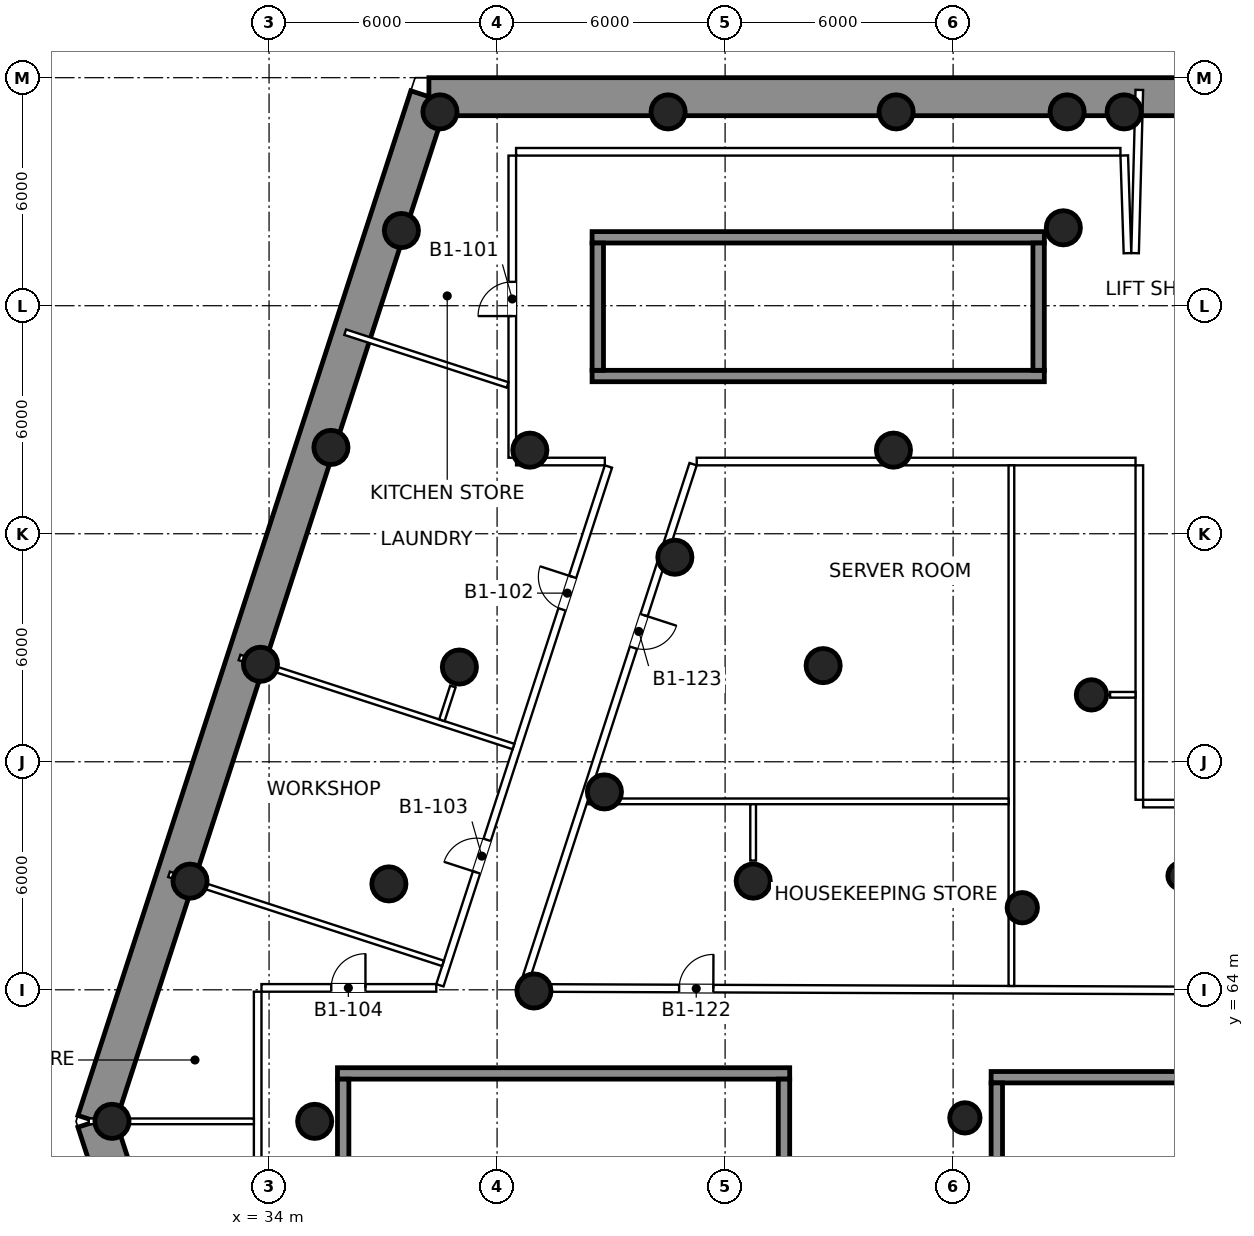
"""IFC4 building model, lengths in metres.
Left out: names, types, materials, properties, quantities, classifications, styles, units other than length and angle.
Written with IfcOpenShell. Run it as: python <this file> out.ifc"""

import sys

from ifc_helpers import new_model, si_unit, direction, frame, frame_2d, origin, origin_2d, place, context, subcontext, project, spatial, rectangle, circle, extrude, element, fill, save


model = new_model("IFC4")
c1 = context("Model", 3, precision=1e-05, world=origin(), true_north=direction((0.0, 1.0)))
c2 = subcontext(c1, "Body", "Model", "MODEL_VIEW")
j1 = project(units=[si_unit("LENGTHUNIT", "METRE"), si_unit("PLANEANGLEUNIT", "RADIAN")], contexts=[c1])
p1 = place(None, origin())
s1 = spatial("IfcSite", under=j1, at=p1, CompositionType="ELEMENT")
p2 = place(p1, origin())
s2 = spatial("IfcBuilding", under=s1, at=p2, CompositionType="ELEMENT")
p3 = place(p2, frame((0.0, 0.0, -5.0)))
s3 = spatial("IfcBuildingStorey", under=s2, at=p3, CompositionType="ELEMENT", Elevation=-5.0)
p4 = place(p3, frame((35.156, 42.963, 0.0), z_axis=(0.0, 0.0, 1.0), x_axis=(-0.309001835939, 0.951061441436, 0.0)))
e1 = element("IfcWall", 1, at=p4, inside=s3, PredefinedType="SOLIDWALL", context=c2, shape_type="SweptSolid", body=[
    extrude(rectangle(XDim=18.481, YDim=1.0, at=frame_2d((9.241, 0.0))), origin(), (0.0, 0.0, 1.0), 4.55),
])
p5 = place(p3, frame((29.446, 60.539, 0.0), z_axis=(0.0, 0.0, 1.0), x_axis=(0.309015382076, 0.951057040161, 0.0)))
e2 = element("IfcWall", 2, at=p5, inside=s3, PredefinedType="SOLIDWALL", context=c2, shape_type="SweptSolid", body=[
    extrude(rectangle(XDim=28.348, YDim=1.0, at=frame_2d((14.174, 0.0))), origin(), (0.0, 0.0, 1.0), 4.55),
])
p6 = place(p3, frame((38.206, 87.5, 0.0), z_axis=(0.0, 0.0, 1.0), x_axis=(1.0, 0.0, 0.0)))
e3 = element("IfcWall", 3, at=p6, inside=s3, PredefinedType="SOLIDWALL", context=c2, shape_type="SweptSolid", body=[
    extrude(rectangle(XDim=20.794, YDim=1.0, at=frame_2d((10.397, 0.0))), origin(), (0.0, 0.0, 1.0), 4.55),
])
for number, where, z_axis, x_axis in (
    (4, (54.9, 84.05, 0.0), (0.0, 0.0, 1.0), (1.0, 0.0, 0.0)),
    (5, (50.43, 78.2, 0.0), (0.0, 0.0, 1.0), (1.0, 0.0, 0.0)),
    (6, (48.58, 72.53, 0.0), (0.0, 0.0, 1.0), (1.0, 0.0, 0.0)),
    (7, (46.74, 66.86, 0.0), (0.0, 0.0, 1.0), (1.0, 0.0, 0.0)),
):
    element("IfcColumn", number, at=place(p3, frame(where, z_axis=z_axis, x_axis=x_axis)), inside=s3, PredefinedType="COLUMN", context=c2, shape_type="SweptSolid", body=[
        extrude(circle(Radius=0.45, at=origin_2d()), origin(), (0.0, 0.0, 1.0), 5.0),
    ])
for number, where, z_axis, x_axis in (
    (8, (52.31, 60.63, 0.0), (0.0, 0.0, 1.0), (1.0, 0.0, 0.0)),
    (9, (55.64, 71.76, 0.0), (0.0, 0.0, 1.0), (1.0, 0.0, 0.0)),
    (10, (53.82, 66.16, 0.0), (0.0, 0.0, 1.0), (1.0, 0.0, 0.0)),
):
    element("IfcColumn", number, at=place(p3, frame(where, z_axis=z_axis, x_axis=x_axis)), inside=s3, PredefinedType="COLUMN", context=c2, shape_type="SweptSolid", body=[
        extrude(circle(Radius=0.4, at=origin_2d()), origin(), (0.0, 0.0, 1.0), 5.0),
    ])
p7 = place(p3, frame((58.0, 67.0, 0.0), z_axis=(0.0, 0.0, 1.0), x_axis=(1.0, 0.0, 0.0)))
e11 = element("IfcColumn", 11, at=p7, inside=s3, PredefinedType="COLUMN", context=c2, shape_type="SweptSolid", body=[
    extrude(circle(Radius=0.35, at=origin_2d()), origin(), (0.0, 0.0, 1.0), 5.0),
])
for number, where, z_axis, x_axis in (
    (12, (29.866, 60.539, 0.0), (0.0, 0.0, 1.0), (1.0, 0.0, 0.0)),
    (13, (56.5, 87.1, 0.0), (0.0, 0.0, 1.0), (1.0, 0.0, 0.0)),
    (14, (50.5, 87.1, 0.0), (0.0, 0.0, 1.0), (1.0, 0.0, 0.0)),
    (15, (44.5, 87.1, 0.0), (0.0, 0.0, 1.0), (1.0, 0.0, 0.0)),
    (16, (38.496, 87.1, 0.0), (0.0, 0.0, 1.0), (1.0, 0.0, 0.0)),
    (17, (37.482, 83.978, 0.0), (0.0, 0.0, 1.0), (1.0, 0.0, 0.0)),
    (18, (35.628, 78.271, 0.0), (0.0, 0.0, 1.0), (1.0, 0.0, 0.0)),
    (19, (33.774, 72.565, 0.0), (0.0, 0.0, 1.0), (1.0, 0.0, 0.0)),
    (20, (31.92, 66.859, 0.0), (0.0, 0.0, 1.0), (1.0, 0.0, 0.0)),
    (21, (35.2, 60.539, 0.0), (0.0, 0.0, 1.0), (1.0, 0.0, 0.0)),
    (22, (40.862, 78.199, 0.0), (0.0, 0.0, 1.0), (1.0, 0.0, 0.0)),
    (23, (39.008, 72.493, 0.0), (0.0, 0.0, 1.0), (1.0, 0.0, 0.0)),
    (24, (37.153, 66.787, 0.0), (0.0, 0.0, 1.0), (1.0, 0.0, 0.0)),
    (25, (55.0, 87.1, 0.0), (0.0, 0.0, 1.0), (1.0, 0.0, 0.0)),
    (26, (44.678, 75.382, 0.0), (0.0, 0.0, 1.0), (1.0, 0.0, 0.0)),
    (27, (42.824, 69.207, 0.0), (0.0, 0.0, 1.0), (1.0, 0.0, 0.0)),
    (28, (40.97, 63.969, 0.0), (0.0, 0.0, 1.0), (1.0, 0.0, 0.0)),
):
    element("IfcColumn", number, at=place(p3, frame(where, z_axis=z_axis, x_axis=x_axis)), inside=s3, PredefinedType="COLUMN", context=c2, shape_type="SweptSolid", body=[
        extrude(circle(Radius=0.45, at=origin_2d()), origin(), (0.0, 0.0, 1.0), 5.0),
    ])
p8 = place(p3, frame((53.0, 61.7, 0.0), z_axis=(0.0, 0.0, 1.0), x_axis=(1.0, 0.0, 0.0)))
e29 = element("IfcWall", 29, at=p8, inside=s3, PredefinedType="SHEAR", context=c2, shape_type="SweptSolid", body=[
    extrude(rectangle(XDim=11.9, YDim=0.3, at=frame_2d((5.95, 0.0))), origin(), (0.0, 0.0, 1.0), 4.55),
])
p9 = place(p3, frame((53.15, 58.2, 0.0), z_axis=(0.0, 0.0, 1.0), x_axis=(0.0, 1.0, 0.0)))
e30 = element("IfcWall", 30, at=p9, inside=s3, PredefinedType="SHEAR", context=c2, shape_type="SweptSolid", body=[
    extrude(rectangle(XDim=3.35, YDim=0.3, at=frame_2d((1.675, 0.0))), origin(), (0.0, 0.0, 1.0), 4.55),
])
p10 = place(p3, frame((35.8, 61.8, 0.0), z_axis=(0.0, 0.0, 1.0), x_axis=(1.0, 0.0, 0.0)))
e31 = element("IfcWall", 31, at=p10, inside=s3, PredefinedType="SHEAR", context=c2, shape_type="SweptSolid", body=[
    extrude(rectangle(XDim=11.9, YDim=0.3, at=frame_2d((5.95, 0.0))), origin(), (0.0, 0.0, 1.0), 4.55),
])
for number, where, z_axis, x_axis in (
    (32, (35.95, 58.3, 0.0), (0.0, 0.0, 1.0), (0.0, 1.0, 0.0)),
    (33, (47.55, 58.3, 0.0), (0.0, 0.0, 1.0), (0.0, 1.0, 0.0)),
):
    element("IfcWall", number, at=place(p3, frame(where, z_axis=z_axis, x_axis=x_axis)), inside=s3, PredefinedType="SHEAR", context=c2, shape_type="SweptSolid", body=[
        extrude(rectangle(XDim=3.35, YDim=0.3, at=frame_2d((1.675, 0.0))), origin(), (0.0, 0.0, 1.0), 4.55),
    ])
for number, where, z_axis, x_axis in (
    (34, (42.5, 80.15, 0.0), (0.0, 0.0, 1.0), (1.0, 0.0, 0.0)),
    (35, (42.5, 83.8, 0.0), (0.0, 0.0, 1.0), (1.0, 0.0, 0.0)),
):
    element("IfcWall", number, at=place(p3, frame(where, z_axis=z_axis, x_axis=x_axis)), inside=s3, PredefinedType="SHEAR", context=c2, shape_type="SweptSolid", body=[
        extrude(rectangle(XDim=11.9, YDim=0.3, at=frame_2d((5.95, 0.0))), origin(), (0.0, 0.0, 1.0), 4.55),
    ])
for number, where, z_axis, x_axis in (
    (36, (42.65, 80.3, 0.0), (0.0, 0.0, 1.0), (0.0, 1.0, 0.0)),
    (37, (54.25, 80.3, 0.0), (0.0, 0.0, 1.0), (0.0, 1.0, 0.0)),
):
    element("IfcWall", number, at=place(p3, frame(where, z_axis=z_axis, x_axis=x_axis)), inside=s3, PredefinedType="SHEAR", context=c2, shape_type="SweptSolid", body=[
        extrude(rectangle(XDim=3.35, YDim=0.3, at=frame_2d((1.675, 0.0))), origin(), (0.0, 0.0, 1.0), 4.55),
    ])
p11 = place(p3, frame((33.7, 56.0, 0.0), z_axis=(0.0, 0.0, 1.0), x_axis=(0.0, 1.0, 0.0)))
e38 = element("IfcWall", 38, at=p11, inside=s3, PredefinedType="PARTITIONING", context=c2, shape_type="SweptSolid", body=[
    extrude(rectangle(XDim=7.95, YDim=0.2, at=frame_2d((3.975, 0.0))), origin(), (0.0, 0.0, 1.0), 4.55),
])
p12 = place(p3, frame((33.8, 64.05, 0.0), z_axis=(0.0, 0.0, 1.0), x_axis=(1.0, 0.0, 0.0)))
e39 = element("IfcWall", 39, at=p12, inside=s3, PredefinedType="PARTITIONING", context=c2, shape_type="SweptSolid", body=[
    extrude(rectangle(XDim=4.6, YDim=0.2, at=frame_2d((2.3, 0.0))), origin(), (0.0, 0.0, 1.0), 3.85),
])
p13 = place(p12, frame((1.836, 0.0, 0.0)))
e40 = element("IfcOpeningElement", 40, at=p13, cuts=e39, PredefinedType="OPENING", context=c2, shape_type="SweptSolid", body=[
    extrude(rectangle(XDim=0.9, YDim=2.1, at=frame_2d((0.45, 1.05))), frame((0.0, 0.11, 0.0), z_axis=(0.0, -1.0, 0.0), x_axis=(1.0, 0.0, 0.0)), (0.0, 0.0, 1.0), 0.22),
])
p14 = place(p3, frame((38.495, 64.119, 0.0), z_axis=(0.0, 0.0, 1.0), x_axis=(0.309012990643, 0.951057817177, 0.0)))
e41 = element("IfcWall", 41, at=p14, inside=s3, PredefinedType="PARTITIONING", context=c2, shape_type="SweptSolid", body=[
    extrude(rectangle(XDim=14.352, YDim=0.2, at=frame_2d((7.176, 0.0))), origin(), (0.0, 0.0, 1.0), 4.55),
])
p15 = place(p14, frame((10.399, 0.0, 0.0)))
e42 = element("IfcOpeningElement", 42, at=p15, cuts=e41, PredefinedType="OPENING", context=c2, shape_type="SweptSolid", body=[
    extrude(rectangle(XDim=0.9, YDim=2.1, at=frame_2d((0.45, 1.05))), frame((0.0, 0.11, 0.0), z_axis=(0.0, -1.0, 0.0), x_axis=(1.0, 0.0, 0.0)), (0.0, 0.0, 1.0), 0.22),
])
p16 = place(p14, frame((3.124, 0.0, 0.0)))
e43 = element("IfcOpeningElement", 43, at=p16, cuts=e41, PredefinedType="OPENING", context=c2, shape_type="SweptSolid", body=[
    extrude(rectangle(XDim=0.9, YDim=2.1, at=frame_2d((0.45, 1.05))), frame((0.0, 0.11, 0.0), z_axis=(0.0, -1.0, 0.0), x_axis=(1.0, 0.0, 0.0)), (0.0, 0.0, 1.0), 0.22),
])
p17 = place(p3, frame((42.835, 77.9, 0.0), z_axis=(0.0, 0.0, 1.0), x_axis=(-1.0, 0.0, 0.0)))
e44 = element("IfcWall", 44, at=p17, inside=s3, PredefinedType="PARTITIONING", context=c2, shape_type="SweptSolid", body=[
    extrude(rectangle(XDim=2.335, YDim=0.2, at=frame_2d((1.167, 0.0))), origin(), (0.0, 0.0, 1.0), 4.55),
])
p18 = place(p3, frame((40.4, 78.0, 0.0), z_axis=(0.0, 0.0, 1.0), x_axis=(0.0, 1.0, 0.0)))
e45 = element("IfcWall", 45, at=p18, inside=s3, PredefinedType="PARTITIONING", context=c2, shape_type="SweptSolid", body=[
    extrude(rectangle(XDim=7.95, YDim=0.2, at=frame_2d((3.975, 0.0))), origin(), (0.0, 0.0, 1.0), 4.55),
])
p19 = place(p18, frame((3.728, 0.0, 0.0)))
e46 = element("IfcOpeningElement", 46, at=p19, cuts=e45, PredefinedType="OPENING", context=c2, shape_type="SweptSolid", body=[
    extrude(rectangle(XDim=0.9, YDim=2.1, at=frame_2d((0.45, 1.05))), frame((0.0, 0.11, 0.0), z_axis=(0.0, -1.0, 0.0), x_axis=(1.0, 0.0, 0.0)), (0.0, 0.0, 1.0), 0.22),
])
p20 = place(p3, frame((40.5, 86.05, 0.0), z_axis=(0.0, 0.0, 1.0), x_axis=(1.0, 0.0, 0.0)))
e47 = element("IfcWall", 47, at=p20, inside=s3, PredefinedType="PARTITIONING", context=c2, shape_type="SweptSolid", body=[
    extrude(rectangle(XDim=15.903, YDim=0.2, at=frame_2d((7.952, 0.0))), origin(), (0.0, 0.0, 1.0), 3.85),
])
p21 = place(p3, frame((56.503, 85.953, 0.0), z_axis=(0.0, 0.0, 1.0), x_axis=(0.033027267016, -0.999454451005, 0.0)))
e48 = element("IfcWall", 48, at=p21, inside=s3, PredefinedType="PARTITIONING", context=c2, shape_type="SweptSolid", body=[
    extrude(rectangle(XDim=2.573, YDim=0.2, at=frame_2d((1.286, 0.0))), origin(), (0.0, 0.0, 1.0), 4.55),
])
p22 = place(p3, frame((56.788, 83.383, 0.0), z_axis=(0.0, 0.0, 1.0), x_axis=(0.026025742555, 0.999661272994, 0.0)))
e49 = element("IfcWall", 49, at=p22, inside=s3, PredefinedType="PARTITIONING", context=c2, shape_type="SweptSolid", body=[
    extrude(rectangle(XDim=4.296, YDim=0.2, at=frame_2d((2.148, 0.0))), origin(), (0.0, 0.0, 1.0), 3.85),
])
p23 = place(p3, frame((68.85, 68.9, 0.0), z_axis=(0.0, 0.0, 1.0), x_axis=(-1.0, 0.0, 0.0)))
e50 = element("IfcWall", 50, at=p23, inside=s3, PredefinedType="PARTITIONING", context=c2, shape_type="SweptSolid", body=[
    extrude(rectangle(XDim=11.85, YDim=0.2, at=frame_2d((5.925, 0.0))), origin(), (0.0, 0.0, 1.0), 4.55),
])
p24 = place(p3, frame((56.9, 69.0, 0.0), z_axis=(0.0, 0.0, 1.0), x_axis=(0.0, 1.0, 0.0)))
e51 = element("IfcWall", 51, at=p24, inside=s3, PredefinedType="PARTITIONING", context=c2, shape_type="SweptSolid", body=[
    extrude(rectangle(XDim=8.8, YDim=0.2, at=frame_2d((4.4, 0.0))), origin(), (0.0, 0.0, 1.0), 3.75),
])
p25 = place(p3, frame((56.8, 77.9, 0.0), z_axis=(0.0, 0.0, 1.0), x_axis=(-1.0, 0.0, 0.0)))
e52 = element("IfcWall", 52, at=p25, inside=s3, PredefinedType="PARTITIONING", context=c2, shape_type="SweptSolid", body=[
    extrude(rectangle(XDim=11.547, YDim=0.2, at=frame_2d((5.773, 0.0))), origin(), (0.0, 0.0, 1.0), 4.55),
])
p26 = place(p3, frame((45.158, 77.831, 0.0), z_axis=(0.0, 0.0, 1.0), x_axis=(-0.309018378218, -0.951056066656, 0.0)))
e53 = element("IfcWall", 53, at=p26, inside=s3, PredefinedType="PARTITIONING", context=c2, shape_type="SweptSolid", body=[
    extrude(rectangle(XDim=14.353, YDim=0.2, at=frame_2d((7.176, 0.0))), origin(), (0.0, 0.0, 1.0), 3.85),
])
p27 = place(p26, frame((4.178, 0.0, 0.0)))
e54 = element("IfcOpeningElement", 54, at=p27, cuts=e53, PredefinedType="OPENING", context=c2, shape_type="SweptSolid", body=[
    extrude(rectangle(XDim=0.9, YDim=2.1, at=frame_2d((0.45, 1.05))), frame((0.0, 0.11, 0.0), z_axis=(0.0, -1.0, 0.0), x_axis=(1.0, 0.0, 0.0)), (0.0, 0.0, 1.0), 0.22),
])
p28 = place(p3, frame((40.817, 64.05, 0.0), z_axis=(0.0, 0.0, 1.0), x_axis=(0.999992779253, -0.003800189715, 0.0)))
e55 = element("IfcWall", 55, at=p28, inside=s3, PredefinedType="PARTITIONING", context=c2, shape_type="SweptSolid", body=[
    extrude(rectangle(XDim=26.083, YDim=0.2, at=frame_2d((13.042, 0.0))), origin(), (0.0, 0.0, 1.0), 3.75),
])
p29 = place(p28, frame((3.973, 0.0, 0.0)))
e56 = element("IfcOpeningElement", 56, at=p29, cuts=e55, PredefinedType="OPENING", context=c2, shape_type="SweptSolid", body=[
    extrude(rectangle(XDim=0.9, YDim=2.1, at=frame_2d((0.45, 1.05))), frame((0.0, 0.11, 0.0), z_axis=(0.0, -1.0, 0.0), x_axis=(1.0, 0.0, 0.0)), (0.0, 0.0, 1.0), 0.22),
])
p30 = place(p28, frame((19.0, 0.0, 0.0)))
e57 = element("IfcOpeningElement", 57, at=p30, cuts=e55, PredefinedType="OPENING", context=c2, shape_type="SweptSolid", body=[
    extrude(rectangle(XDim=0.9, YDim=2.1, at=frame_2d((0.45, 1.05))), frame((0.0, 0.11, 0.0), z_axis=(0.0, -1.0, 0.0), x_axis=(1.0, 0.0, 0.0)), (0.0, 0.0, 1.0), 0.22),
])
p31 = place(p3, frame((29.256, 60.539, 0.0), z_axis=(0.0, 0.0, 1.0), x_axis=(1.0, 0.0, 0.0)))
e58 = element("IfcWall", 58, at=p31, inside=s3, PredefinedType="PARTITIONING", context=c2, shape_type="SweptSolid", body=[
    extrude(rectangle(XDim=4.344, YDim=0.15, at=frame_2d((2.172, 0.0))), origin(), (0.0, 0.0, 1.0), 4.55),
])
p32 = place(p3, frame((36.003, 81.304, 0.0), z_axis=(0.0, 0.0, 1.0), x_axis=(0.951052033902, -0.309030789422, 0.0)))
e59 = element("IfcWall", 59, at=p32, inside=s3, PredefinedType="PARTITIONING", context=c2, shape_type="SweptSolid", body=[
    extrude(rectangle(XDim=4.494, YDim=0.15, at=frame_2d((2.247, 0.0))), origin(), (0.0, 0.0, 1.0), 4.55),
])
for number, where, z_axis, x_axis in (
    (60, (33.222, 72.744, 0.0), (0.0, 0.0, 1.0), (0.951, -0.309, 0.0)),
    (61, (31.368, 67.038, 0.0), (0.0, 0.0, 1.0), (0.951, -0.309, 0.0)),
):
    element("IfcWall", number, at=place(p3, frame(where, z_axis=z_axis, x_axis=x_axis)), inside=s3, PredefinedType="PARTITIONING", context=c2, shape_type="SweptSolid", body=[
        extrude(rectangle(XDim=7.58, YDim=0.15, at=frame_2d((3.79, 0.0))), origin(), (0.0, 0.0, 1.0), 3.85),
    ])
p33 = place(p3, frame((53.534, 64.101, 0.0), z_axis=(0.0, 0.0, 1.0), x_axis=(0.0, 1.0, 0.0)))
e62 = element("IfcWall", 62, at=p33, inside=s3, PredefinedType="PARTITIONING", context=c2, shape_type="SweptSolid", body=[
    extrude(rectangle(XDim=13.699, YDim=0.15, at=frame_2d((6.849, 0.0))), origin(), (0.0, 0.0, 1.0), 3.75),
])
p34 = place(p3, frame((42.405, 68.958, 0.0), z_axis=(0.0, 0.0, 1.0), x_axis=(1.0, 0.0, 0.0)))
e63 = element("IfcWall", 63, at=p34, inside=s3, PredefinedType="PARTITIONING", context=c2, shape_type="SweptSolid", body=[
    extrude(rectangle(XDim=11.054, YDim=0.15, at=frame_2d((5.527, 0.0))), origin(), (0.0, 0.0, 1.0), 3.85),
])
p35 = place(p3, frame((46.738, 67.4, 0.0), z_axis=(0.0, 0.0, 1.0), x_axis=(0.0, 1.0, 0.0)))
e64 = element("IfcWall", 64, at=p35, inside=s3, PredefinedType="PARTITIONING", context=c2, shape_type="SweptSolid", body=[
    extrude(rectangle(XDim=1.484, YDim=0.15, at=frame_2d((0.742, 0.0))), origin(), (0.0, 0.0, 1.0), 3.85),
])
p36 = place(p3, frame((56.13, 71.762, 0.0), z_axis=(0.0, 0.0, 1.0), x_axis=(1.0, 0.0, 0.0)))
e65 = element("IfcWall", 65, at=p36, inside=s3, PredefinedType="PARTITIONING", context=c2, shape_type="SweptSolid", body=[
    extrude(rectangle(XDim=0.67, YDim=0.15, at=frame_2d((0.335, 0.0))), origin(), (0.0, 0.0, 1.0), 3.75),
])
p37 = place(p3, frame((38.837, 71.981, 0.0), z_axis=(0.0, 0.0, 1.0), x_axis=(-0.309086072338, -0.951034068731, 0.0)))
e66 = element("IfcWall", 66, at=p37, inside=s3, PredefinedType="PARTITIONING", context=c2, shape_type="SweptSolid", body=[
    extrude(rectangle(XDim=0.934, YDim=0.15, at=frame_2d((0.467, 0.0))), origin(), (0.0, 0.0, 1.0), 3.85),
])
p38 = place(p19, origin())
e67 = element("IfcDoor", 67, at=p38, inside=s3, OperationType="SINGLE_SWING_LEFT", PredefinedType="DOOR", context=c2, shape_type="SweptSolid", body=[
    extrude(rectangle(XDim=0.9, YDim=2.1, at=frame_2d((0.45, 1.05))), frame((0.0, 0.025, 0.0), z_axis=(0.0, -1.0, 0.0), x_axis=(1.0, 0.0, 0.0)), (0.0, 0.0, 1.0), 0.05),
])
fill(e46, e67)
p39 = place(p15, origin())
e68 = element("IfcDoor", 68, at=p39, inside=s3, OperationType="SINGLE_SWING_RIGHT", PredefinedType="DOOR", context=c2, shape_type="SweptSolid", body=[
    extrude(rectangle(XDim=0.9, YDim=2.1, at=frame_2d((0.45, 1.05))), frame((0.0, 0.025, 0.0), z_axis=(0.0, -1.0, 0.0), x_axis=(1.0, 0.0, 0.0)), (0.0, 0.0, 1.0), 0.05),
])
fill(e42, e68)
p40 = place(p16, origin())
e69 = element("IfcDoor", 69, at=p40, inside=s3, OperationType="SINGLE_SWING_LEFT", PredefinedType="DOOR", context=c2, shape_type="SweptSolid", body=[
    extrude(rectangle(XDim=0.9, YDim=2.1, at=frame_2d((0.45, 1.05))), frame((0.0, 0.025, 0.0), z_axis=(0.0, -1.0, 0.0), x_axis=(1.0, 0.0, 0.0)), (0.0, 0.0, 1.0), 0.05),
])
fill(e43, e69)
p41 = place(p13, origin())
e70 = element("IfcDoor", 70, at=p41, inside=s3, OperationType="SINGLE_SWING_RIGHT", PredefinedType="DOOR", context=c2, shape_type="SweptSolid", body=[
    extrude(rectangle(XDim=0.9, YDim=2.1, at=frame_2d((0.45, 1.05))), frame((0.0, 0.025, 0.0), z_axis=(0.0, -1.0, 0.0), x_axis=(1.0, 0.0, 0.0)), (0.0, 0.0, 1.0), 0.05),
])
fill(e40, e70)
p42 = place(p29, origin())
e71 = element("IfcDoor", 71, at=p42, inside=s3, OperationType="SINGLE_SWING_RIGHT", PredefinedType="DOOR", context=c2, shape_type="SweptSolid", body=[
    extrude(rectangle(XDim=0.9, YDim=2.1, at=frame_2d((0.45, 1.05))), frame((0.0, 0.025, 0.0), z_axis=(0.0, -1.0, 0.0), x_axis=(1.0, 0.0, 0.0)), (0.0, 0.0, 1.0), 0.05),
])
fill(e56, e71)
p43 = place(p27, origin())
e72 = element("IfcDoor", 72, at=p43, inside=s3, OperationType="SINGLE_SWING_LEFT", PredefinedType="DOOR", context=c2, shape_type="SweptSolid", body=[
    extrude(rectangle(XDim=0.9, YDim=2.1, at=frame_2d((0.45, 1.05))), frame((0.0, 0.025, 0.0), z_axis=(0.0, -1.0, 0.0), x_axis=(1.0, 0.0, 0.0)), (0.0, 0.0, 1.0), 0.05),
])
fill(e54, e72)
save(model, sys.argv[1])
